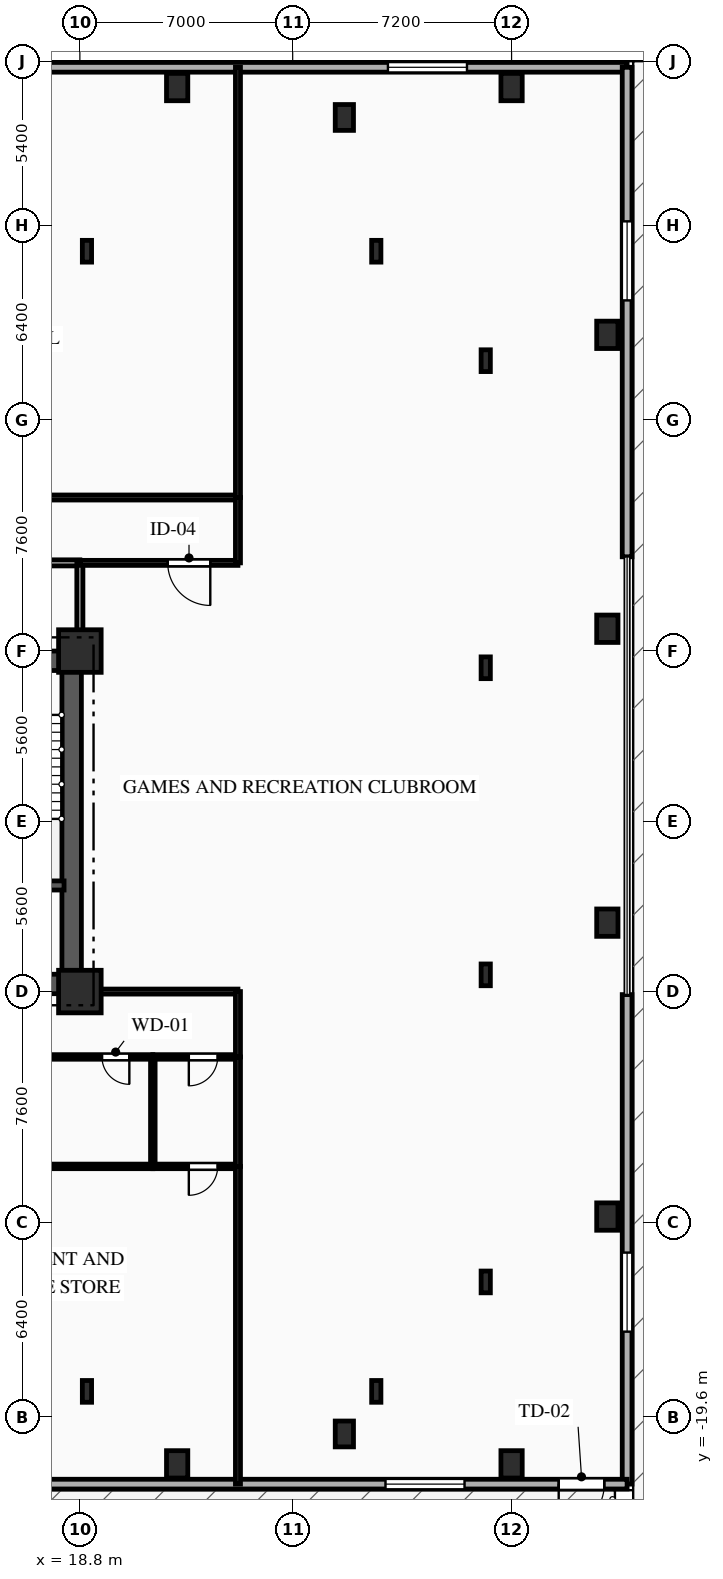
"""IFC4 building model, lengths in metres.
Left out: names, types, materials, properties, quantities, classifications, styles, units other than length and angle.
Written with IfcOpenShell. Run it as: python <this file> out.ifc"""

import sys

from ifc_helpers import new_model, si_unit, direction, frame, frame_2d, origin, origin_2d, place, context, subcontext, project, spatial, rectangle, i_section, extrude, element, fill, save


model = new_model("IFC4")
c1 = context("Model", 3, precision=1e-05, world=origin(), true_north=direction((0.0, 1.0)))
c2 = subcontext(c1, "Body", "Model", "MODEL_VIEW")
j1 = project(units=[si_unit("LENGTHUNIT", "METRE"), si_unit("PLANEANGLEUNIT", "RADIAN")], contexts=[c1])
p1 = place(None, origin())
s1 = spatial("IfcSite", under=j1, at=p1, CompositionType="ELEMENT")
p2 = place(p1, origin())
s2 = spatial("IfcBuilding", under=s1, at=p2, CompositionType="ELEMENT")
p3 = place(p2, frame((0.0, 0.0, 13.5)))
s3 = spatial("IfcBuildingStorey", under=s2, at=p3, CompositionType="ELEMENT", Elevation=13.5)
for number, where, z_axis, x_axis in (
    (1, (18.8, -5.6, 0.0), (0.0, 0.0, 1.0), (1.0, 0.0, 0.0)),
    (2, (18.8, 5.6, 0.0), (0.0, 0.0, 1.0), (1.0, 0.0, 0.0)),
):
    element("IfcColumn", number, at=place(p3, frame(where, z_axis=z_axis, x_axis=x_axis)), inside=s3, PredefinedType="COLUMN", context=c2, shape_type="SweptSolid", body=[
        extrude(rectangle(XDim=1.4, YDim=1.4, at=origin_2d()), origin(), (0.0, 0.0, 1.0), 4.5),
    ])
for number, where, z_axis, x_axis in (
    (3, (22.0, -21.15, 0.0), (0.0, 0.0, 1.0), (1.0, 0.0, 0.0)),
    (4, (33.0, -21.15, 0.0), (0.0, 0.0, 1.0), (1.0, 0.0, 0.0)),
    (5, (22.0, 24.15, 0.0), (0.0, 0.0, 1.0), (1.0, 0.0, 0.0)),
    (6, (33.0, 24.15, 0.0), (0.0, 0.0, 1.0), (1.0, 0.0, 0.0)),
    (7, (36.15, -13.0, 0.0), (0.0, 0.0, 1.0), (1.0, 0.0, 0.0)),
    (8, (36.15, -3.333, 0.0), (0.0, 0.0, 1.0), (1.0, 0.0, 0.0)),
    (9, (36.15, 6.333, 0.0), (0.0, 0.0, 1.0), (1.0, 0.0, 0.0)),
    (10, (36.15, 16.0, 0.0), (0.0, 0.0, 1.0), (1.0, 0.0, 0.0)),
):
    element("IfcColumn", number, at=place(p3, frame(where, z_axis=z_axis, x_axis=x_axis)), inside=s3, PredefinedType="COLUMN", context=c2, shape_type="SweptSolid", body=[
        extrude(rectangle(XDim=0.7, YDim=0.9, at=origin_2d()), origin(), (0.0, 0.0, 1.0), 4.5),
    ])
for number, where, z_axis, x_axis in (
    (11, (27.5, -20.15, 0.0), (0.0, 0.0, 1.0), (1.0, 0.0, 0.0)),
    (12, (27.5, 23.15, 0.0), (0.0, 0.0, 1.0), (1.0, 0.0, 0.0)),
):
    element("IfcColumn", number, at=place(p3, frame(where, z_axis=z_axis, x_axis=x_axis)), inside=s3, PredefinedType="PILASTER", context=c2, shape_type="SweptSolid", body=[
        extrude(rectangle(XDim=0.6, YDim=0.85, at=origin_2d()), origin(), (0.0, 0.0, 1.0), 4.5),
    ])
for number, where, z_axis, x_axis in (
    (13, (19.033, -18.75, 0.0), (0.0, 0.0, 1.0), (1.0, 0.0, 0.0)),
    (14, (28.55, -18.75, 0.0), (0.0, 0.0, 1.0), (1.0, 0.0, 0.0)),
    (15, (28.55, 18.75, 0.0), (0.0, 0.0, 1.0), (1.0, 0.0, 0.0)),
    (16, (19.033, 18.75, 0.0), (0.0, 0.0, 1.0), (1.0, 0.0, 0.0)),
    (17, (32.15, -15.15, 0.0), (0.0, 0.0, 1.0), (1.0, 0.0, 0.0)),
    (18, (32.15, -5.05, 0.0), (0.0, 0.0, 1.0), (1.0, 0.0, 0.0)),
    (19, (32.15, 5.05, 0.0), (0.0, 0.0, 1.0), (1.0, 0.0, 0.0)),
    (20, (32.15, 15.15, 0.0), (0.0, 0.0, 1.0), (1.0, 0.0, 0.0)),
):
    element("IfcColumn", number, at=place(p3, frame(where, z_axis=z_axis, x_axis=x_axis)), inside=s3, PredefinedType="COLUMN", context=c2, shape_type="SweptSolid", body=[
        extrude(i_section(OverallWidth=0.304, OverallDepth=0.716, WebThickness=0.021, FlangeThickness=0.04, FilletRadius=0.027, at=origin_2d()), origin(), (0.0, 0.0, 1.0), 4.5),
    ])
p4 = place(p3, frame((-36.8, 24.8, 0.0), z_axis=(0.0, 0.0, 1.0), x_axis=(1.0, 0.0, 0.0)))
e21 = element("IfcWall", 21, at=p4, inside=s3, PredefinedType="SOLIDWALL", context=c2, shape_type="SweptSolid", body=[
    extrude(rectangle(XDim=73.6, YDim=0.32, at=frame_2d((36.8, 0.0))), origin(), (0.0, 0.0, 1.0), 4.17),
])
p5 = place(p4, frame((5.347, 0.0, 0.85)))
e22 = element("IfcOpeningElement", 22, at=p5, cuts=e21, PredefinedType="OPENING", context=c2, shape_type="SweptSolid", body=[
    extrude(rectangle(XDim=2.6, YDim=2.4, at=frame_2d((1.3, 1.2))), frame((0.0, 0.17, 0.0), z_axis=(0.0, -1.0, 0.0), x_axis=(1.0, 0.0, 0.0)), (0.0, 0.0, 1.0), 0.34),
])
p6 = place(p4, frame((20.448, 0.0, 0.85)))
e23 = element("IfcOpeningElement", 23, at=p6, cuts=e21, PredefinedType="OPENING", context=c2, shape_type="SweptSolid", body=[
    extrude(rectangle(XDim=2.6, YDim=2.4, at=frame_2d((1.3, 1.2))), frame((0.0, 0.17, 0.0), z_axis=(0.0, -1.0, 0.0), x_axis=(1.0, 0.0, 0.0)), (0.0, 0.0, 1.0), 0.34),
])
p7 = place(p4, frame((44.474, 0.0, 0.85)))
e24 = element("IfcOpeningElement", 24, at=p7, cuts=e21, PredefinedType="OPENING", context=c2, shape_type="SweptSolid", body=[
    extrude(rectangle(XDim=2.6, YDim=2.4, at=frame_2d((1.3, 1.2))), frame((0.0, 0.17, 0.0), z_axis=(0.0, -1.0, 0.0), x_axis=(1.0, 0.0, 0.0)), (0.0, 0.0, 1.0), 0.34),
])
p8 = place(p4, frame((65.733, 0.0, 0.85)))
e25 = element("IfcOpeningElement", 25, at=p8, cuts=e21, PredefinedType="OPENING", context=c2, shape_type="SweptSolid", body=[
    extrude(rectangle(XDim=2.6, YDim=2.4, at=frame_2d((1.3, 1.2))), frame((0.0, 0.17, 0.0), z_axis=(0.0, -1.0, 0.0), x_axis=(1.0, 0.0, 0.0)), (0.0, 0.0, 1.0), 0.34),
])
p9 = place(p3, frame((36.8, 24.8, 0.0), z_axis=(0.0, 0.0, 1.0), x_axis=(0.0, -1.0, 0.0)))
e26 = element("IfcWall", 26, at=p9, inside=s3, PredefinedType="SOLIDWALL", context=c2, shape_type="SweptSolid", body=[
    extrude(rectangle(XDim=16.1, YDim=0.32, at=frame_2d((8.05, 0.0))), origin(), (0.0, 0.0, 1.0), 4.17),
])
p10 = place(p9, frame((5.067, 0.0, 0.85)))
e27 = element("IfcOpeningElement", 27, at=p10, cuts=e26, PredefinedType="OPENING", context=c2, shape_type="SweptSolid", body=[
    extrude(rectangle(XDim=2.6, YDim=2.4, at=frame_2d((1.3, 1.2))), frame((0.0, 0.17, 0.0), z_axis=(0.0, -1.0, 0.0), x_axis=(1.0, 0.0, 0.0)), (0.0, 0.0, 1.0), 0.34),
])
p11 = place(p3, frame((36.8, -5.7, 0.0), z_axis=(0.0, 0.0, 1.0), x_axis=(0.0, -1.0, 0.0)))
e28 = element("IfcWall", 28, at=p11, inside=s3, PredefinedType="SOLIDWALL", context=c2, shape_type="SweptSolid", body=[
    extrude(rectangle(XDim=16.1, YDim=0.32, at=frame_2d((8.05, 0.0))), origin(), (0.0, 0.0, 1.0), 4.17),
])
p12 = place(p11, frame((8.485, 0.0, 0.85)))
e29 = element("IfcOpeningElement", 29, at=p12, cuts=e28, PredefinedType="OPENING", context=c2, shape_type="SweptSolid", body=[
    extrude(rectangle(XDim=2.6, YDim=2.4, at=frame_2d((1.3, 1.2))), frame((0.0, 0.17, 0.0), z_axis=(0.0, -1.0, 0.0), x_axis=(1.0, 0.0, 0.0)), (0.0, 0.0, 1.0), 0.34),
])
p13 = place(p3, frame((36.8, -21.8, 0.0), z_axis=(0.0, 0.0, 1.0), x_axis=(-1.0, 0.0, 0.0)))
e30 = element("IfcWall", 30, at=p13, inside=s3, PredefinedType="SOLIDWALL", context=c2, shape_type="SweptSolid", body=[
    extrude(rectangle(XDim=73.6, YDim=0.32, at=frame_2d((36.8, 0.0))), origin(), (0.0, 0.0, 1.0), 4.17),
])
p14 = place(p13, frame((0.75, 0.0, 0.0)))
e31 = element("IfcOpeningElement", 31, at=p14, cuts=e30, PredefinedType="OPENING", context=c2, shape_type="SweptSolid", body=[
    extrude(rectangle(XDim=1.5, YDim=2.2, at=frame_2d((0.75, 1.1))), frame((0.0, 0.17, 0.0), z_axis=(0.0, -1.0, 0.0), x_axis=(1.0, 0.0, 0.0)), (0.0, 0.0, 1.0), 0.34),
])
p15 = place(p13, frame((5.347, 0.0, 0.85)))
e32 = element("IfcOpeningElement", 32, at=p15, cuts=e30, PredefinedType="OPENING", context=c2, shape_type="SweptSolid", body=[
    extrude(rectangle(XDim=2.6, YDim=2.4, at=frame_2d((1.3, 1.2))), frame((0.0, 0.17, 0.0), z_axis=(0.0, -1.0, 0.0), x_axis=(1.0, 0.0, 0.0)), (0.0, 0.0, 1.0), 0.34),
])
p16 = place(p13, frame((29.293, 0.0, 0.85)))
e33 = element("IfcOpeningElement", 33, at=p16, cuts=e30, PredefinedType="OPENING", context=c2, shape_type="SweptSolid", body=[
    extrude(rectangle(XDim=2.6, YDim=2.4, at=frame_2d((1.3, 1.2))), frame((0.0, 0.17, 0.0), z_axis=(0.0, -1.0, 0.0), x_axis=(1.0, 0.0, 0.0)), (0.0, 0.0, 1.0), 0.34),
])
p17 = place(p13, frame((49.195, 0.0, 0.85)))
e34 = element("IfcOpeningElement", 34, at=p17, cuts=e30, PredefinedType="OPENING", context=c2, shape_type="SweptSolid", body=[
    extrude(rectangle(XDim=2.6, YDim=2.4, at=frame_2d((1.3, 1.2))), frame((0.0, 0.17, 0.0), z_axis=(0.0, -1.0, 0.0), x_axis=(1.0, 0.0, 0.0)), (0.0, 0.0, 1.0), 0.34),
])
p18 = place(p13, frame((65.733, 0.0, 0.85)))
e35 = element("IfcOpeningElement", 35, at=p18, cuts=e30, PredefinedType="OPENING", context=c2, shape_type="SweptSolid", body=[
    extrude(rectangle(XDim=2.6, YDim=2.4, at=frame_2d((1.3, 1.2))), frame((0.0, 0.17, 0.0), z_axis=(0.0, -1.0, 0.0), x_axis=(1.0, 0.0, 0.0)), (0.0, 0.0, 1.0), 0.34),
])
p19 = place(p3, frame((9.2, 5.28, 0.0), z_axis=(0.0, 0.0, 1.0), x_axis=(1.0, 0.0, 0.0)))
e36 = element("IfcWall", 36, at=p19, inside=s3, PredefinedType="SHEAR", context=c2, shape_type="SweptSolid", body=[
    extrude(rectangle(XDim=9.6, YDim=0.64, at=frame_2d((4.8, 0.0))), origin(), (0.0, 0.0, 1.0), 4.17),
])
p20 = place(p19, frame((6.95, 0.0, 0.0)))
e37 = element("IfcOpeningElement", 37, at=p20, cuts=e36, PredefinedType="OPENING", context=c2, shape_type="SweptSolid", body=[
    extrude(rectangle(XDim=1.1, YDim=2.15, at=frame_2d((0.55, 1.075))), frame((0.0, 0.33, 0.0), z_axis=(0.0, -1.0, 0.0), x_axis=(1.0, 0.0, 0.0)), (0.0, 0.0, 1.0), 0.66),
])
p21 = place(p19, frame((3.775, 0.0, 0.0)))
e38 = element("IfcOpeningElement", 38, at=p21, cuts=e36, PredefinedType="OPENING", context=c2, shape_type="SweptSolid", body=[
    extrude(rectangle(XDim=1.05, YDim=2.1, at=frame_2d((0.525, 1.05))), frame((0.0, 0.33, 0.0), z_axis=(0.0, -1.0, 0.0), x_axis=(1.0, 0.0, 0.0)), (0.0, 0.0, 1.0), 0.66),
])
p22 = place(p3, frame((9.2, -5.35, 0.0), z_axis=(0.0, 0.0, 1.0), x_axis=(1.0, 0.0, 0.0)))
e39 = element("IfcWall", 39, at=p22, inside=s3, PredefinedType="SHEAR", context=c2, shape_type="SweptSolid", body=[
    extrude(rectangle(XDim=9.6, YDim=0.64, at=frame_2d((4.8, 0.0))), origin(), (0.0, 0.0, 1.0), 4.17),
])
p23 = place(p22, frame((7.65, 0.0, 0.0)))
e40 = element("IfcOpeningElement", 40, at=p23, cuts=e39, PredefinedType="OPENING", context=c2, shape_type="SweptSolid", body=[
    extrude(rectangle(XDim=0.9, YDim=2.1, at=frame_2d((0.45, 1.05))), frame((0.0, 0.33, 0.0), z_axis=(0.0, -1.0, 0.0), x_axis=(1.0, 0.0, 0.0)), (0.0, 0.0, 1.0), 0.66),
])
p24 = place(p3, frame((18.53, -5.05, 0.0), z_axis=(0.0, 0.0, 1.0), x_axis=(0.0, 1.0, 0.0)))
e41 = element("IfcWall", 41, at=p24, inside=s3, PredefinedType="SHEAR", context=c2, shape_type="SweptSolid", body=[
    extrude(rectangle(XDim=10.1, YDim=0.64, at=frame_2d((5.05, 0.0))), origin(), (0.0, 0.0, 1.0), 4.17),
])
p25 = place(p3, frame((15.1, -2.11, 0.0), z_axis=(0.0, 0.0, 1.0), x_axis=(1.0, 0.0, 0.0)))
e42 = element("IfcWall", 42, at=p25, inside=s3, PredefinedType="SHEAR", context=c2, shape_type="SweptSolid", body=[
    extrude(rectangle(XDim=3.18, YDim=0.3, at=frame_2d((1.59, 0.0))), origin(), (0.0, 0.0, 1.0), 4.17),
])
p26 = place(p3, frame((18.8, 8.5, 0.0), z_axis=(0.0, 0.0, 1.0), x_axis=(-1.0, 0.0, 0.0)))
e43 = element("IfcWall", 43, at=p26, inside=s3, PredefinedType="PARTITIONING", context=c2, shape_type="SweptSolid", body=[
    extrude(rectangle(XDim=6.8, YDim=0.2, at=frame_2d((3.4, 0.0))), origin(), (0.0, 0.0, 1.0), 4.17),
])
p27 = place(p26, frame((3.985, 0.0, 0.0)))
e44 = element("IfcOpeningElement", 44, at=p27, cuts=e43, PredefinedType="OPENING", context=c2, shape_type="SweptSolid", body=[
    extrude(rectangle(XDim=1.1, YDim=2.15, at=frame_2d((0.55, 1.075))), frame((0.0, 0.11, 0.0), z_axis=(0.0, -1.0, 0.0), x_axis=(1.0, 0.0, 0.0)), (0.0, 0.0, 1.0), 0.22),
])
p28 = place(p3, frame((18.8, 5.6, 0.0), z_axis=(0.0, 0.0, 1.0), x_axis=(0.0, 1.0, 0.0)))
e45 = element("IfcWall", 45, at=p28, inside=s3, PredefinedType="PARTITIONING", context=c2, shape_type="SweptSolid", body=[
    extrude(rectangle(XDim=2.9, YDim=0.2, at=frame_2d((1.45, 0.0))), origin(), (0.0, 0.0, 1.0), 3.655),
])
p29 = place(p3, frame((0.0, 10.65, 0.0), z_axis=(0.0, 0.0, 1.0), x_axis=(1.0, 0.0, 0.0)))
e46 = element("IfcWall", 46, at=p29, inside=s3, PredefinedType="PARTITIONING", context=c2, shape_type="SweptSolid", body=[
    extrude(rectangle(XDim=24.0, YDim=0.165, at=frame_2d((12.0, 0.0))), origin(), (0.0, 0.0, 1.0), 4.17),
])
p30 = place(p29, frame((3.26, 0.0, 0.0)))
e47 = element("IfcOpeningElement", 47, at=p30, cuts=e46, PredefinedType="OPENING", context=c2, shape_type="SweptSolid", body=[
    extrude(rectangle(XDim=1.4, YDim=2.3, at=frame_2d((0.7, 1.15))), frame((0.0, 0.093, 0.0), z_axis=(0.0, -1.0, 0.0), x_axis=(1.0, 0.0, 0.0)), (0.0, 0.0, 1.0), 0.185),
])
p31 = place(p3, frame((24.0, 8.5, 0.0), z_axis=(0.0, 0.0, 1.0), x_axis=(-1.0, 0.0, 0.0)))
e48 = element("IfcWall", 48, at=p31, inside=s3, PredefinedType="PARTITIONING", context=c2, shape_type="SweptSolid", body=[
    extrude(rectangle(XDim=5.2, YDim=0.165, at=frame_2d((2.6, 0.0))), origin(), (0.0, 0.0, 1.0), 4.17),
])
p32 = place(p31, frame((0.91, 0.0, 0.0)))
e49 = element("IfcOpeningElement", 49, at=p32, cuts=e48, PredefinedType="OPENING", context=c2, shape_type="SweptSolid", body=[
    extrude(rectangle(XDim=1.4, YDim=2.3, at=frame_2d((0.7, 1.15))), frame((0.0, 0.093, 0.0), z_axis=(0.0, -1.0, 0.0), x_axis=(1.0, 0.0, 0.0)), (0.0, 0.0, 1.0), 0.185),
])
p33 = place(p3, frame((24.0, 10.65, 0.0), z_axis=(0.0, 0.0, 1.0), x_axis=(0.0, -1.0, 0.0)))
e50 = element("IfcWall", 50, at=p33, inside=s3, PredefinedType="PARTITIONING", context=c2, shape_type="SweptSolid", body=[
    extrude(rectangle(XDim=2.15, YDim=0.165, at=frame_2d((1.075, 0.0))), origin(), (0.0, 0.0, 1.0), 4.17),
])
p34 = place(p3, frame((21.2, -7.75, 0.0), z_axis=(0.0, 0.0, 1.0), x_axis=(-1.0, 0.0, 0.0)))
e51 = element("IfcWall", 51, at=p34, inside=s3, PredefinedType="PLUMBINGWALL", context=c2, shape_type="SweptSolid", body=[
    extrude(rectangle(XDim=3.6, YDim=0.15, at=frame_2d((1.8, 0.0))), origin(), (0.0, 0.0, 1.0), 4.17),
])
p35 = place(p34, frame((0.772, 0.0, 0.0)))
e52 = element("IfcOpeningElement", 52, at=p35, cuts=e51, PredefinedType="OPENING", context=c2, shape_type="SweptSolid", body=[
    extrude(rectangle(XDim=0.9, YDim=2.1, at=frame_2d((0.45, 1.05))), frame((0.0, 0.085, 0.0), z_axis=(0.0, -1.0, 0.0), x_axis=(1.0, 0.0, 0.0)), (0.0, 0.0, 1.0), 0.17),
])
p36 = place(p3, frame((24.0, -7.75, 0.0), z_axis=(0.0, 0.0, 1.0), x_axis=(-1.0, 0.0, 0.0)))
e53 = element("IfcWall", 53, at=p36, inside=s3, PredefinedType="PARTITIONING", context=c2, shape_type="SweptSolid", body=[
    extrude(rectangle(XDim=2.8, YDim=0.15, at=frame_2d((1.4, 0.0))), origin(), (0.0, 0.0, 1.0), 4.17),
])
p37 = place(p36, frame((0.666, 0.0, 0.0)))
e54 = element("IfcOpeningElement", 54, at=p37, cuts=e53, PredefinedType="OPENING", context=c2, shape_type="SweptSolid", body=[
    extrude(rectangle(XDim=0.95, YDim=2.1, at=frame_2d((0.475, 1.05))), frame((0.0, 0.085, 0.0), z_axis=(0.0, -1.0, 0.0), x_axis=(1.0, 0.0, 0.0)), (0.0, 0.0, 1.0), 0.17),
])
p38 = place(p3, frame((18.8, -5.6, 0.0), z_axis=(0.0, 0.0, 1.0), x_axis=(1.0, 0.0, 0.0)))
e55 = element("IfcWall", 55, at=p38, inside=s3, PredefinedType="PARTITIONING", context=c2, shape_type="SweptSolid", body=[
    extrude(rectangle(XDim=5.2, YDim=0.165, at=frame_2d((2.6, 0.0))), origin(), (0.0, 0.0, 1.0), 4.17),
])
p39 = place(p3, frame((24.0, -5.6, 0.0), z_axis=(0.0, 0.0, 1.0), x_axis=(0.0, -1.0, 0.0)))
e56 = element("IfcWall", 56, at=p39, inside=s3, PredefinedType="PARTITIONING", context=c2, shape_type="SweptSolid", body=[
    extrude(rectangle(XDim=2.15, YDim=0.165, at=frame_2d((1.075, 0.0))), origin(), (0.0, 0.0, 1.0), 4.17),
])
p40 = place(p3, frame((21.2, -7.75, 0.0), z_axis=(0.0, 0.0, 1.0), x_axis=(0.0, -1.0, 0.0)))
e57 = element("IfcWall", 57, at=p40, inside=s3, PredefinedType="PLUMBINGWALL", context=c2, shape_type="SweptSolid", body=[
    extrude(rectangle(XDim=3.6, YDim=0.15, at=frame_2d((1.8, 0.0))), origin(), (0.0, 0.0, 1.0), 4.17),
])
p41 = place(p3, frame((21.2, -11.35, 0.0), z_axis=(0.0, 0.0, 1.0), x_axis=(-1.0, 0.0, 0.0)))
e58 = element("IfcWall", 58, at=p41, inside=s3, PredefinedType="PLUMBINGWALL", context=c2, shape_type="SweptSolid", body=[
    extrude(rectangle(XDim=3.6, YDim=0.15, at=frame_2d((1.8, 0.0))), origin(), (0.0, 0.0, 1.0), 4.17),
])
p42 = place(p3, frame((24.0, -11.35, 0.0), z_axis=(0.0, 0.0, 1.0), x_axis=(-1.0, 0.0, 0.0)))
e59 = element("IfcWall", 59, at=p42, inside=s3, PredefinedType="PARTITIONING", context=c2, shape_type="SweptSolid", body=[
    extrude(rectangle(XDim=2.8, YDim=0.15, at=frame_2d((1.4, 0.0))), origin(), (0.0, 0.0, 1.0), 4.17),
])
p43 = place(p42, frame((0.666, 0.0, 0.0)))
e60 = element("IfcOpeningElement", 60, at=p43, cuts=e59, PredefinedType="OPENING", context=c2, shape_type="SweptSolid", body=[
    extrude(rectangle(XDim=0.95, YDim=2.1, at=frame_2d((0.475, 1.05))), frame((0.0, 0.085, 0.0), z_axis=(0.0, -1.0, 0.0), x_axis=(1.0, 0.0, 0.0)), (0.0, 0.0, 1.0), 0.17),
])
p44 = place(p3, frame((24.0, -7.75, 0.0), z_axis=(0.0, 0.0, 1.0), x_axis=(0.0, -1.0, 0.0)))
e61 = element("IfcWall", 61, at=p44, inside=s3, PredefinedType="PARTITIONING", context=c2, shape_type="SweptSolid", body=[
    extrude(rectangle(XDim=3.6, YDim=0.165, at=frame_2d((1.8, 0.0))), origin(), (0.0, 0.0, 1.0), 4.17),
])
p45 = place(p3, frame((24.0, -11.35, 0.0), z_axis=(0.0, 0.0, 1.0), x_axis=(0.0, -1.0, 0.0)))
e62 = element("IfcWall", 62, at=p45, inside=s3, PredefinedType="PARTITIONING", context=c2, shape_type="SweptSolid", body=[
    extrude(rectangle(XDim=10.45, YDim=0.165, at=frame_2d((5.225, 0.0))), origin(), (0.0, 0.0, 1.0), 4.17),
])
p46 = place(p3, frame((24.0, 24.8, 0.0), z_axis=(0.0, 0.0, 1.0), x_axis=(0.0, -1.0, 0.0)))
e63 = element("IfcWall", 63, at=p46, inside=s3, PredefinedType="PARTITIONING", context=c2, shape_type="SweptSolid", body=[
    extrude(rectangle(XDim=14.15, YDim=0.165, at=frame_2d((7.075, 0.0))), origin(), (0.0, 0.0, 1.0), 4.17),
])
p47 = place(p8, origin())
e64 = element("IfcWindow", 64, at=p47, inside=s3, PartitioningType="SINGLE_PANEL", PredefinedType="WINDOW", context=c2, shape_type="SweptSolid", body=[
    extrude(rectangle(XDim=2.6, YDim=2.4, at=frame_2d((1.3, 1.2))), frame((0.0, 0.03, 0.0), z_axis=(0.0, -1.0, 0.0), x_axis=(1.0, 0.0, 0.0)), (0.0, 0.0, 1.0), 0.06),
])
fill(e25, e64)
p48 = place(p10, origin())
e65 = element("IfcWindow", 65, at=p48, inside=s3, PartitioningType="SINGLE_PANEL", PredefinedType="WINDOW", context=c2, shape_type="SweptSolid", body=[
    extrude(rectangle(XDim=2.6, YDim=2.4, at=frame_2d((1.3, 1.2))), frame((0.0, 0.03, 0.0), z_axis=(0.0, -1.0, 0.0), x_axis=(1.0, 0.0, 0.0)), (0.0, 0.0, 1.0), 0.06),
])
fill(e27, e65)
p49 = place(p12, origin())
e66 = element("IfcWindow", 66, at=p49, inside=s3, PartitioningType="SINGLE_PANEL", PredefinedType="WINDOW", context=c2, shape_type="SweptSolid", body=[
    extrude(rectangle(XDim=2.6, YDim=2.4, at=frame_2d((1.3, 1.2))), frame((0.0, 0.03, 0.0), z_axis=(0.0, -1.0, 0.0), x_axis=(1.0, 0.0, 0.0)), (0.0, 0.0, 1.0), 0.06),
])
fill(e29, e66)
p50 = place(p14, origin())
e67 = element("IfcDoor", 67, at=p50, inside=s3, OperationType="SINGLE_SWING_RIGHT", PredefinedType="DOOR", context=c2, shape_type="SweptSolid", body=[
    extrude(rectangle(XDim=1.5, YDim=2.2, at=frame_2d((0.75, 1.1))), frame((0.0, 0.025, 0.0), z_axis=(0.0, -1.0, 0.0), x_axis=(1.0, 0.0, 0.0)), (0.0, 0.0, 1.0), 0.05),
])
fill(e31, e67)
p51 = place(p15, origin())
e68 = element("IfcWindow", 68, at=p51, inside=s3, PartitioningType="SINGLE_PANEL", PredefinedType="WINDOW", context=c2, shape_type="SweptSolid", body=[
    extrude(rectangle(XDim=2.6, YDim=2.4, at=frame_2d((1.3, 1.2))), frame((0.0, 0.03, 0.0), z_axis=(0.0, -1.0, 0.0), x_axis=(1.0, 0.0, 0.0)), (0.0, 0.0, 1.0), 0.06),
])
fill(e32, e68)
p52 = place(p32, origin())
e69 = element("IfcDoor", 69, at=p52, inside=s3, OperationType="SINGLE_SWING_LEFT", PredefinedType="DOOR", context=c2, shape_type="SweptSolid", body=[
    extrude(rectangle(XDim=1.4, YDim=2.3, at=frame_2d((0.7, 1.15))), frame((0.0, 0.025, 0.0), z_axis=(0.0, -1.0, 0.0), x_axis=(1.0, 0.0, 0.0)), (0.0, 0.0, 1.0), 0.05),
])
fill(e49, e69)
p53 = place(p35, origin())
e70 = element("IfcDoor", 70, at=p53, inside=s3, OperationType="SINGLE_SWING_LEFT", PredefinedType="DOOR", context=c2, shape_type="SweptSolid", body=[
    extrude(rectangle(XDim=0.9, YDim=2.1, at=frame_2d((0.45, 1.05))), frame((0.0, 0.025, 0.0), z_axis=(0.0, -1.0, 0.0), x_axis=(1.0, 0.0, 0.0)), (0.0, 0.0, 1.0), 0.05),
])
fill(e52, e70)
p54 = place(p37, origin())
e71 = element("IfcDoor", 71, at=p54, inside=s3, OperationType="SINGLE_SWING_RIGHT", PredefinedType="DOOR", context=c2, shape_type="SweptSolid", body=[
    extrude(rectangle(XDim=0.95, YDim=2.1, at=frame_2d((0.475, 1.05))), frame((0.0, 0.025, 0.0), z_axis=(0.0, -1.0, 0.0), x_axis=(1.0, 0.0, 0.0)), (0.0, 0.0, 1.0), 0.05),
])
fill(e54, e71)
p55 = place(p43, origin())
e72 = element("IfcDoor", 72, at=p55, inside=s3, OperationType="SINGLE_SWING_RIGHT", PredefinedType="DOOR", context=c2, shape_type="SweptSolid", body=[
    extrude(rectangle(XDim=0.95, YDim=2.1, at=frame_2d((0.475, 1.05))), frame((0.0, 0.025, 0.0), z_axis=(0.0, -1.0, 0.0), x_axis=(1.0, 0.0, 0.0)), (0.0, 0.0, 1.0), 0.05),
])
fill(e60, e72)
save(model, sys.argv[1])
